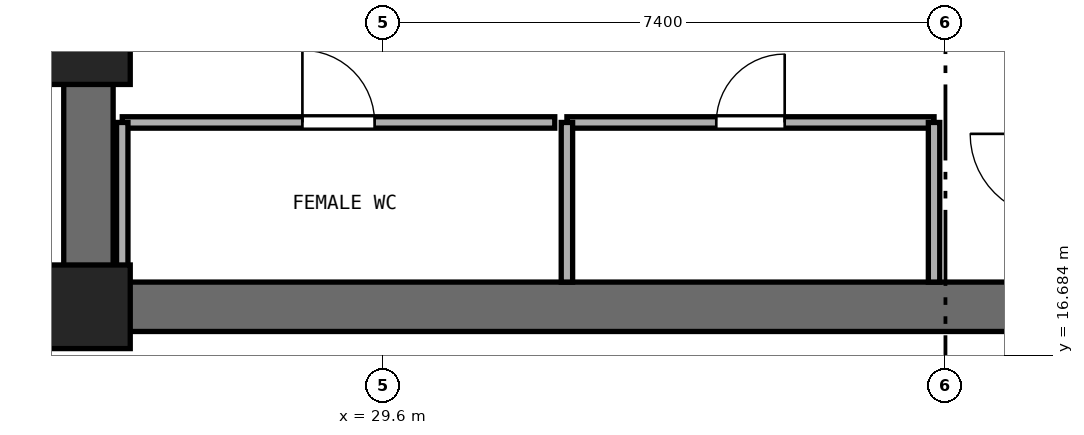
"""IFC4 building model, lengths in metres.
Left out: names, types, materials, properties, quantities, classifications, styles, units other than length and angle.
Written with IfcOpenShell. Run it as: python <this file> out.ifc"""

import sys

from ifc_helpers import new_model, si_unit, direction, frame, frame_2d, origin, origin_2d, place, context, subcontext, project, spatial, rectangle, extrude, element, fill, save


model = new_model("IFC4")
c1 = context("Model", 3, precision=1e-05, world=origin(), true_north=direction((0.0, 1.0)))
c2 = subcontext(c1, "Body", "Model", "MODEL_VIEW")
j1 = project(units=[si_unit("LENGTHUNIT", "METRE"), si_unit("PLANEANGLEUNIT", "RADIAN")], contexts=[c1])
p1 = place(None, origin())
s1 = spatial("IfcSite", under=j1, at=p1, CompositionType="ELEMENT")
p2 = place(p1, origin())
s2 = spatial("IfcBuilding", under=s1, at=p2, CompositionType="ELEMENT")
p3 = place(p2, frame((0.0, 0.0, 15.0)))
s3 = spatial("IfcBuildingStorey", under=s2, at=p3, CompositionType="ELEMENT", Elevation=15.0)
p4 = place(p3, frame((25.4, 17.325, 0.0), z_axis=(0.0, 0.0, 1.0), x_axis=(1.0, 0.0, 0.0)))
e1 = element("IfcWall", 1, at=p4, inside=s3, PredefinedType="SHEAR", context=c2, shape_type="SweptSolid", body=[
    extrude(rectangle(XDim=23.2, YDim=0.65, at=frame_2d((11.6, 0.0))), origin(), (0.0, 0.0, 1.0), 4.68),
])
p5 = place(p3, frame((25.725, 17.65, 0.0), z_axis=(0.0, 0.0, 1.0), x_axis=(0.0, 1.0, 0.0)))
e2 = element("IfcWall", 2, at=p5, inside=s3, PredefinedType="SHEAR", context=c2, shape_type="SweptSolid", body=[
    extrude(rectangle(XDim=15.1, YDim=0.65, at=frame_2d((7.55, 0.0))), origin(), (0.0, 0.0, 1.0), 4.68),
])
p6 = place(p5, frame((6.8, 0.0, 0.0)))
e3 = element("IfcOpeningElement", 3, at=p6, cuts=e2, PredefinedType="OPENING", context=c2, shape_type="SweptSolid", body=[
    extrude(rectangle(XDim=1.5, YDim=2.15, at=frame_2d((0.75, 1.075))), frame((0.0, 0.335, 0.0), z_axis=(0.0, -1.0, 0.0), x_axis=(1.0, 0.0, 0.0)), (0.0, 0.0, 1.0), 0.67),
])
for number, where, z_axis, x_axis in (
    (4, (25.725, 17.325, 0.0), (0.0, 0.0, 1.0), (1.0, 0.0, 0.0)),
    (5, (25.725, 20.8, 0.0), (0.0, 0.0, 1.0), (1.0, 0.0, 0.0)),
):
    element("IfcColumn", number, at=place(p3, frame(where, z_axis=z_axis, x_axis=x_axis)), inside=s3, PredefinedType="PILASTER", context=c2, shape_type="SweptSolid", body=[
        extrude(rectangle(XDim=1.1, YDim=1.1, at=origin_2d()), origin(), (0.0, 0.0, 1.0), 5.0),
    ])
p7 = place(p3, frame((26.17, 19.75, 0.0), z_axis=(0.0, 0.0, 1.0), x_axis=(1.0, 0.0, 0.0)))
e6 = element("IfcWall", 6, at=p7, inside=s3, PredefinedType="PARTITIONING", context=c2, shape_type="SweptSolid", body=[
    extrude(rectangle(XDim=5.69, YDim=0.15, at=frame_2d((2.845, 0.0))), origin(), (0.0, 0.0, 1.0), 4.68),
])
p8 = place(p7, frame((2.37, 0.0, 0.0)))
e7 = element("IfcOpeningElement", 7, at=p8, cuts=e6, PredefinedType="OPENING", context=c2, shape_type="SweptSolid", body=[
    extrude(rectangle(XDim=0.95, YDim=2.1, at=frame_2d((0.475, 1.05))), frame((0.0, 0.085, 0.0), z_axis=(0.0, -1.0, 0.0), x_axis=(1.0, 0.0, 0.0)), (0.0, 0.0, 1.0), 0.17),
])
p9 = place(p3, frame((26.17, 17.65, 0.0), z_axis=(0.0, 0.0, 1.0), x_axis=(0.0, 1.0, 0.0)))
e8 = element("IfcWall", 8, at=p9, inside=s3, PredefinedType="PARTITIONING", context=c2, shape_type="SweptSolid", body=[
    extrude(rectangle(XDim=2.1, YDim=0.15, at=frame_2d((1.05, 0.0))), origin(), (0.0, 0.0, 1.0), 4.68),
])
p10 = place(p3, frame((32.02, 19.75, 0.0), z_axis=(0.0, 0.0, 1.0), x_axis=(1.0, 0.0, 0.0)))
e9 = element("IfcWall", 9, at=p10, inside=s3, PredefinedType="PARTITIONING", context=c2, shape_type="SweptSolid", body=[
    extrude(rectangle(XDim=4.83, YDim=0.15, at=frame_2d((2.415, 0.0))), origin(), (0.0, 0.0, 1.0), 4.68),
])
p11 = place(p10, frame((1.965, 0.0, 0.0)))
e10 = element("IfcOpeningElement", 10, at=p11, cuts=e9, PredefinedType="OPENING", context=c2, shape_type="SweptSolid", body=[
    extrude(rectangle(XDim=0.9, YDim=2.1, at=frame_2d((0.45, 1.05))), frame((0.0, 0.085, 0.0), z_axis=(0.0, -1.0, 0.0), x_axis=(1.0, 0.0, 0.0)), (0.0, 0.0, 1.0), 0.17),
])
for number, where, z_axis, x_axis in (
    (11, (32.02, 17.65, 0.0), (0.0, 0.0, 1.0), (0.0, 1.0, 0.0)),
    (12, (36.85, 17.65, 0.0), (0.0, 0.0, 1.0), (0.0, 1.0, 0.0)),
):
    element("IfcWall", number, at=place(p3, frame(where, z_axis=z_axis, x_axis=x_axis)), inside=s3, PredefinedType="PARTITIONING", context=c2, shape_type="SweptSolid", body=[
        extrude(rectangle(XDim=2.1, YDim=0.15, at=frame_2d((1.05, 0.0))), origin(), (0.0, 0.0, 1.0), 4.68),
    ])
p12 = place(p8, origin())
e13 = element("IfcDoor", 13, at=p12, inside=s3, OperationType="SINGLE_SWING_LEFT", PredefinedType="DOOR", context=c2, shape_type="SweptSolid", body=[
    extrude(rectangle(XDim=0.95, YDim=2.1, at=frame_2d((0.475, 1.05))), frame((0.0, 0.025, 0.0), z_axis=(0.0, -1.0, 0.0), x_axis=(1.0, 0.0, 0.0)), (0.0, 0.0, 1.0), 0.05),
])
fill(e7, e13)
p13 = place(p11, origin())
e14 = element("IfcDoor", 14, at=p13, inside=s3, OperationType="SINGLE_SWING_RIGHT", PredefinedType="DOOR", context=c2, shape_type="SweptSolid", body=[
    extrude(rectangle(XDim=0.9, YDim=2.1, at=frame_2d((0.45, 1.05))), frame((0.0, 0.025, 0.0), z_axis=(0.0, -1.0, 0.0), x_axis=(1.0, 0.0, 0.0)), (0.0, 0.0, 1.0), 0.05),
])
fill(e10, e14)
save(model, sys.argv[1])
